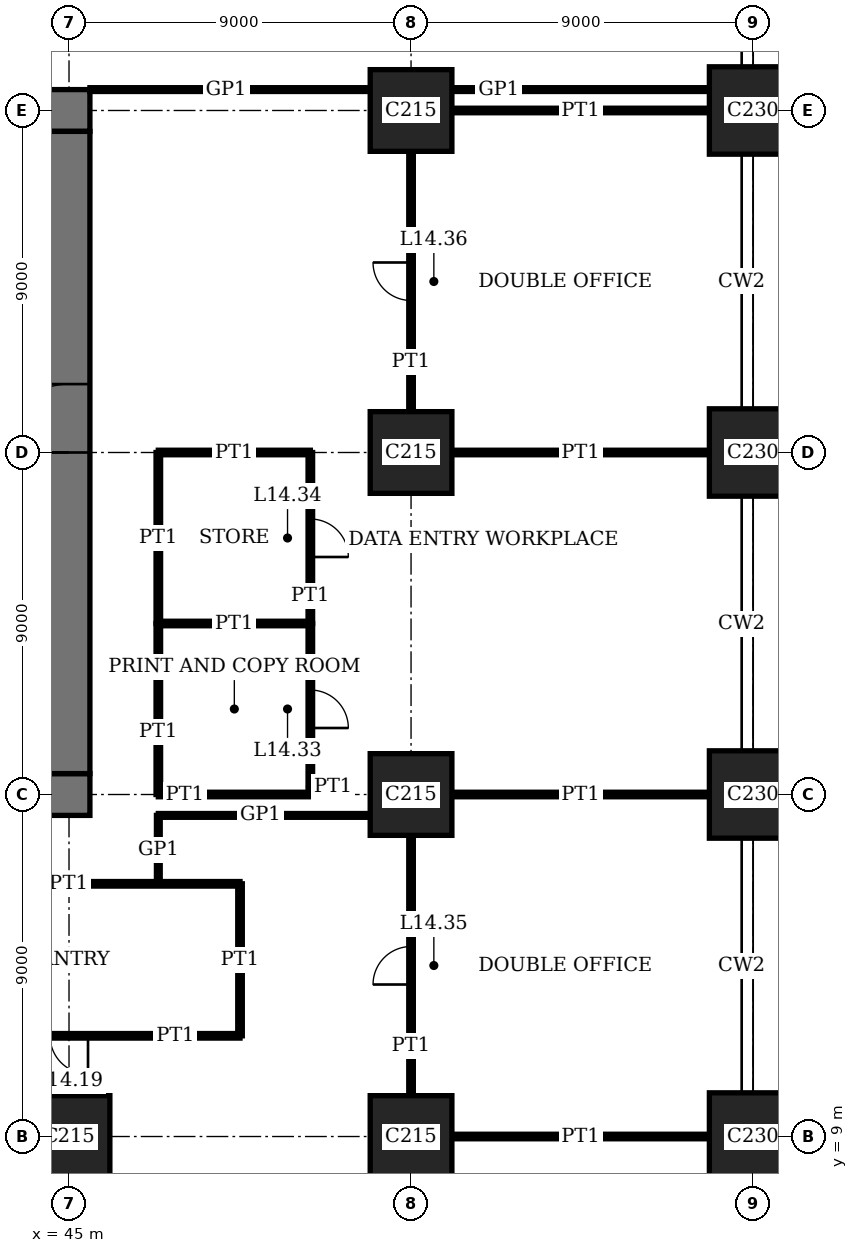
"""IFC4 building model, lengths in metres.
Left out: names, types, materials, properties, quantities, classifications, styles, units other than length and angle.
Written with IfcOpenShell. Run it as: python <this file> out.ifc"""

import sys

from ifc_helpers import new_model, si_unit, direction, frame, frame_2d, origin, origin_2d, place, context, subcontext, project, spatial, rectangle, extrude, element, fill, save


model = new_model("IFC4")
c1 = context("Model", 3, precision=1e-05, world=origin(), true_north=direction((0.0, 1.0)))
c2 = subcontext(c1, "Body", "Model", "MODEL_VIEW")
j1 = project(units=[si_unit("LENGTHUNIT", "METRE"), si_unit("PLANEANGLEUNIT", "RADIAN")], contexts=[c1])
p1 = place(None, origin())
s1 = spatial("IfcSite", under=j1, at=p1, CompositionType="ELEMENT")
p2 = place(p1, origin())
s2 = spatial("IfcBuilding", under=s1, at=p2, CompositionType="ELEMENT")
p3 = place(p2, frame((0.0, 0.0, 59.8)))
s3 = spatial("IfcBuildingStorey", under=s2, at=p3, CompositionType="ELEMENT", Elevation=59.8)
for number, where, z_axis, x_axis in (
    (1, (45.0, 9.0, 0.0), (0.0, 0.0, 1.0), (1.0, 0.0, 0.0)),
    (2, (54.0, 9.0, 0.0), (0.0, 0.0, 1.0), (1.0, 0.0, 0.0)),
    (3, (54.0, 18.0, 0.0), (0.0, 0.0, 1.0), (1.0, 0.0, 0.0)),
    (4, (54.0, 27.0, 0.0), (0.0, 0.0, 1.0), (1.0, 0.0, 0.0)),
    (5, (54.0, 36.0, 0.0), (0.0, 0.0, 1.0), (1.0, 0.0, 0.0)),
):
    element("IfcColumn", number, at=place(p3, frame(where, z_axis=z_axis, x_axis=x_axis)), inside=s3, PredefinedType="COLUMN", context=c2, shape_type="SweptSolid", body=[
        extrude(rectangle(XDim=2.15, YDim=2.15, at=origin_2d()), origin(), (0.0, 0.0, 1.0), 4.0),
    ])
for number, where, z_axis, x_axis in (
    (6, (63.0, 9.0, 0.0), (0.0, 0.0, 1.0), (1.0, 0.0, 0.0)),
    (7, (63.0, 18.0, 0.0), (0.0, 0.0, 1.0), (1.0, 0.0, 0.0)),
    (8, (63.0, 27.0, 0.0), (0.0, 0.0, 1.0), (1.0, 0.0, 0.0)),
    (9, (63.0, 36.0, 0.0), (0.0, 0.0, 1.0), (1.0, 0.0, 0.0)),
):
    element("IfcColumn", number, at=place(p3, frame(where, z_axis=z_axis, x_axis=x_axis)), inside=s3, PredefinedType="COLUMN", context=c2, shape_type="SweptSolid", body=[
        extrude(rectangle(XDim=2.3, YDim=2.3, at=origin_2d()), origin(), (0.0, 0.0, 1.0), 4.0),
    ])
p4 = place(p3, frame((17.45, 18.0, 0.0), z_axis=(0.0, 0.0, 1.0), x_axis=(1.0, 0.0, 0.0)))
e10 = element("IfcWall", 10, at=p4, inside=s3, PredefinedType="SHEAR", context=c2, shape_type="SweptSolid", body=[
    extrude(rectangle(XDim=28.1, YDim=1.1, at=frame_2d((14.05, 0.0))), origin(), (0.0, 0.0, 1.0), 4.0),
])
p5 = place(p4, frame((11.55, 0.0, 0.0)))
e11 = element("IfcOpeningElement", 11, at=p5, cuts=e10, PredefinedType="OPENING", context=c2, shape_type="SweptSolid", body=[
    extrude(rectangle(XDim=1.0, YDim=2.4, at=frame_2d((0.5, 1.2))), frame((0.0, 0.56, 0.0), z_axis=(0.0, -1.0, 0.0), x_axis=(1.0, 0.0, 0.0)), (0.0, 0.0, 1.0), 1.12),
])
p6 = place(p4, frame((16.55, 0.0, 0.0)))
e12 = element("IfcOpeningElement", 12, at=p6, cuts=e10, PredefinedType="OPENING", context=c2, shape_type="SweptSolid", body=[
    extrude(rectangle(XDim=1.0, YDim=2.4, at=frame_2d((0.5, 1.2))), frame((0.0, 0.56, 0.0), z_axis=(0.0, -1.0, 0.0), x_axis=(1.0, 0.0, 0.0)), (0.0, 0.0, 1.0), 1.12),
])
p7 = place(p4, frame((20.0, 0.0, 0.0)))
e13 = element("IfcOpeningElement", 13, at=p7, cuts=e10, PredefinedType="OPENING", context=c2, shape_type="SweptSolid", body=[
    extrude(rectangle(XDim=1.1, YDim=2.4, at=frame_2d((0.55, 1.2))), frame((0.0, 0.56, 0.0), z_axis=(0.0, -1.0, 0.0), x_axis=(1.0, 0.0, 0.0)), (0.0, 0.0, 1.0), 1.12),
])
p8 = place(p4, frame((24.05, 0.0, 0.0)))
e14 = element("IfcOpeningElement", 14, at=p8, cuts=e10, PredefinedType="OPENING", context=c2, shape_type="SweptSolid", body=[
    extrude(rectangle(XDim=1.0, YDim=2.4, at=frame_2d((0.5, 1.2))), frame((0.0, 0.56, 0.0), z_axis=(0.0, -1.0, 0.0), x_axis=(1.0, 0.0, 0.0)), (0.0, 0.0, 1.0), 1.12),
])
p9 = place(p3, frame((45.55, 36.0, 0.0), z_axis=(0.0, 0.0, 1.0), x_axis=(-1.0, 0.0, 0.0)))
e15 = element("IfcWall", 15, at=p9, inside=s3, PredefinedType="SHEAR", context=c2, shape_type="SweptSolid", body=[
    extrude(rectangle(XDim=28.1, YDim=1.1, at=frame_2d((14.05, 0.0))), origin(), (0.0, 0.0, 1.0), 4.0),
])
p10 = place(p9, frame((11.55, 0.0, 0.0)))
e16 = element("IfcOpeningElement", 16, at=p10, cuts=e15, PredefinedType="OPENING", context=c2, shape_type="SweptSolid", body=[
    extrude(rectangle(XDim=1.0, YDim=2.4, at=frame_2d((0.5, 1.2))), frame((0.0, 0.56, 0.0), z_axis=(0.0, -1.0, 0.0), x_axis=(1.0, 0.0, 0.0)), (0.0, 0.0, 1.0), 1.12),
])
p11 = place(p9, frame((16.55, 0.0, 0.0)))
e17 = element("IfcOpeningElement", 17, at=p11, cuts=e15, PredefinedType="OPENING", context=c2, shape_type="SweptSolid", body=[
    extrude(rectangle(XDim=1.0, YDim=2.4, at=frame_2d((0.5, 1.2))), frame((0.0, 0.56, 0.0), z_axis=(0.0, -1.0, 0.0), x_axis=(1.0, 0.0, 0.0)), (0.0, 0.0, 1.0), 1.12),
])
p12 = place(p9, frame((20.0, 0.0, 0.0)))
e18 = element("IfcOpeningElement", 18, at=p12, cuts=e15, PredefinedType="OPENING", context=c2, shape_type="SweptSolid", body=[
    extrude(rectangle(XDim=1.1, YDim=2.4, at=frame_2d((0.55, 1.2))), frame((0.0, 0.56, 0.0), z_axis=(0.0, -1.0, 0.0), x_axis=(1.0, 0.0, 0.0)), (0.0, 0.0, 1.0), 1.12),
])
p13 = place(p9, frame((24.05, 0.0, 0.0)))
e19 = element("IfcOpeningElement", 19, at=p13, cuts=e15, PredefinedType="OPENING", context=c2, shape_type="SweptSolid", body=[
    extrude(rectangle(XDim=1.0, YDim=2.4, at=frame_2d((0.5, 1.2))), frame((0.0, 0.56, 0.0), z_axis=(0.0, -1.0, 0.0), x_axis=(1.0, 0.0, 0.0)), (0.0, 0.0, 1.0), 1.12),
])
p14 = place(p3, frame((45.0, 18.55, 0.0), z_axis=(0.0, 0.0, 1.0), x_axis=(0.0, 1.0, 0.0)))
e20 = element("IfcWall", 20, at=p14, inside=s3, PredefinedType="SHEAR", context=c2, shape_type="SweptSolid", body=[
    extrude(rectangle(XDim=16.9, YDim=1.1, at=frame_2d((8.45, 0.0))), origin(), (0.0, 0.0, 1.0), 4.0),
])
p15 = place(p14, frame((8.45, 0.0, 0.0)))
e21 = element("IfcOpeningElement", 21, at=p15, cuts=e20, PredefinedType="OPENING", context=c2, shape_type="SweptSolid", body=[
    extrude(rectangle(XDim=1.8, YDim=2.4, at=frame_2d((0.9, 1.2))), frame((0.0, 0.56, 0.0), z_axis=(0.0, -1.0, 0.0), x_axis=(1.0, 0.0, 0.0)), (0.0, 0.0, 1.0), 1.12),
])
p16 = place(p3, frame((55.075, 9.0, 0.0), z_axis=(0.0, 0.0, 1.0), x_axis=(1.0, 0.0, 0.0)))
e22 = element("IfcWall", 22, at=p16, inside=s3, PredefinedType="PARTITIONING", context=c2, shape_type="SweptSolid", body=[
    extrude(rectangle(XDim=6.775, YDim=0.12, at=frame_2d((3.388, 0.0))), origin(), (0.0, 0.0, 1.0), 3.05),
])
p17 = place(p3, frame((40.5, 11.65, 0.0), z_axis=(0.0, 0.0, 1.0), x_axis=(1.0, 0.0, 0.0)))
e23 = element("IfcWall", 23, at=p17, inside=s3, PredefinedType="PARTITIONING", context=c2, shape_type="SweptSolid", body=[
    extrude(rectangle(XDim=9.0, YDim=0.12, at=frame_2d((4.5, 0.0))), origin(), (0.0, 0.0, 1.0), 3.75),
])
p18 = place(p17, frame((4.0, 0.0, 0.0)))
e24 = element("IfcOpeningElement", 24, at=p18, cuts=e23, PredefinedType="OPENING", context=c2, shape_type="SweptSolid", body=[
    extrude(rectangle(XDim=1.0, YDim=2.4, at=frame_2d((0.5, 1.2))), frame((0.0, 0.07, 0.0), z_axis=(0.0, -1.0, 0.0), x_axis=(1.0, 0.0, 0.0)), (0.0, 0.0, 1.0), 0.14),
])
p19 = place(p3, frame((40.5, 15.65, 0.0), z_axis=(0.0, 0.0, 1.0), x_axis=(1.0, 0.0, 0.0)))
e25 = element("IfcWall", 25, at=p19, inside=s3, PredefinedType="PARTITIONING", context=c2, shape_type="SweptSolid", body=[
    extrude(rectangle(XDim=9.0, YDim=0.12, at=frame_2d((4.5, 0.0))), origin(), (0.0, 0.0, 1.0), 3.75),
])
p20 = place(p3, frame((47.35, 17.45, 0.0), z_axis=(0.0, 0.0, 1.0), x_axis=(1.0, 0.0, 0.0)))
e26 = element("IfcWall", 26, at=p20, inside=s3, PredefinedType="PARTITIONING", context=c2, shape_type="SweptSolid", body=[
    extrude(rectangle(XDim=5.575, YDim=0.1, at=frame_2d((2.788, 0.0))), origin(), (0.0, 0.0, 1.0), 3.75),
])
p21 = place(p3, frame((47.35, 18.0, 0.0), z_axis=(0.0, 0.0, 1.0), x_axis=(1.0, 0.0, 0.0)))
e27 = element("IfcWall", 27, at=p21, inside=s3, PredefinedType="PARTITIONING", context=c2, shape_type="SweptSolid", body=[
    extrude(rectangle(XDim=4.0, YDim=0.12, at=frame_2d((2.0, 0.0))), origin(), (0.0, 0.0, 1.0), 3.05),
])
p22 = place(p3, frame((55.075, 18.0, 0.0), z_axis=(0.0, 0.0, 1.0), x_axis=(1.0, 0.0, 0.0)))
e28 = element("IfcWall", 28, at=p22, inside=s3, PredefinedType="PARTITIONING", context=c2, shape_type="SweptSolid", body=[
    extrude(rectangle(XDim=6.775, YDim=0.12, at=frame_2d((3.388, 0.0))), origin(), (0.0, 0.0, 1.0), 3.05),
])
p23 = place(p3, frame((47.35, 22.5, 0.0), z_axis=(0.0, 0.0, 1.0), x_axis=(1.0, 0.0, 0.0)))
e29 = element("IfcWall", 29, at=p23, inside=s3, PredefinedType="PARTITIONING", context=c2, shape_type="SweptSolid", body=[
    extrude(rectangle(XDim=4.0, YDim=0.12, at=frame_2d((2.0, 0.0))), origin(), (0.0, 0.0, 1.0), 3.1),
])
p24 = place(p3, frame((47.35, 27.0, 0.0), z_axis=(0.0, 0.0, 1.0), x_axis=(1.0, 0.0, 0.0)))
e30 = element("IfcWall", 30, at=p24, inside=s3, PredefinedType="PARTITIONING", context=c2, shape_type="SweptSolid", body=[
    extrude(rectangle(XDim=4.0, YDim=0.12, at=frame_2d((2.0, 0.0))), origin(), (0.0, 0.0, 1.0), 3.05),
])
for number, where, z_axis, x_axis in (
    (31, (55.075, 27.0, 0.0), (0.0, 0.0, 1.0), (1.0, 0.0, 0.0)),
    (32, (55.075, 36.0, 0.0), (0.0, 0.0, 1.0), (1.0, 0.0, 0.0)),
):
    element("IfcWall", number, at=place(p3, frame(where, z_axis=z_axis, x_axis=x_axis)), inside=s3, PredefinedType="PARTITIONING", context=c2, shape_type="SweptSolid", body=[
        extrude(rectangle(XDim=6.775, YDim=0.12, at=frame_2d((3.388, 0.0))), origin(), (0.0, 0.0, 1.0), 3.05),
    ])
p25 = place(p3, frame((45.55, 36.55, 0.0), z_axis=(0.0, 0.0, 1.0), x_axis=(1.0, 0.0, 0.0)))
e33 = element("IfcWall", 33, at=p25, inside=s3, PredefinedType="PARTITIONING", context=c2, shape_type="SweptSolid", body=[
    extrude(rectangle(XDim=7.375, YDim=0.1, at=frame_2d((3.688, 0.0))), origin(), (0.0, 0.0, 1.0), 3.75),
])
p26 = place(p3, frame((55.075, 36.55, 0.0), z_axis=(0.0, 0.0, 1.0), x_axis=(1.0, 0.0, 0.0)))
e34 = element("IfcWall", 34, at=p26, inside=s3, PredefinedType="PARTITIONING", context=c2, shape_type="SweptSolid", body=[
    extrude(rectangle(XDim=6.775, YDim=0.1, at=frame_2d((3.388, 0.0))), origin(), (0.0, 0.0, 1.0), 3.75),
])
for number, where, z_axis, x_axis in (
    (35, (47.35, 18.0, 0.0), (0.0, 0.0, 1.0), (0.0, 1.0, 0.0)),
    (36, (47.35, 22.5, 0.0), (0.0, 0.0, 1.0), (0.0, 1.0, 0.0)),
):
    element("IfcWall", number, at=place(p3, frame(where, z_axis=z_axis, x_axis=x_axis)), inside=s3, PredefinedType="PARTITIONING", context=c2, shape_type="SweptSolid", body=[
        extrude(rectangle(XDim=4.5, YDim=0.12, at=frame_2d((2.25, 0.0))), origin(), (0.0, 0.0, 1.0), 3.75),
    ])
p27 = place(p3, frame((47.35, 15.65, 0.0), z_axis=(0.0, 0.0, 1.0), x_axis=(0.0, 1.0, 0.0)))
e37 = element("IfcWall", 37, at=p27, inside=s3, PredefinedType="PARTITIONING", context=c2, shape_type="SweptSolid", body=[
    extrude(rectangle(XDim=1.8, YDim=0.1, at=frame_2d((0.9, 0.0))), origin(), (0.0, 0.0, 1.0), 3.75),
])
p28 = place(p3, frame((49.5, 11.65, 0.0), z_axis=(0.0, 0.0, 1.0), x_axis=(0.0, 1.0, 0.0)))
e38 = element("IfcWall", 38, at=p28, inside=s3, PredefinedType="PARTITIONING", context=c2, shape_type="SweptSolid", body=[
    extrude(rectangle(XDim=4.0, YDim=0.12, at=frame_2d((2.0, 0.0))), origin(), (0.0, 0.0, 1.0), 3.75),
])
p29 = place(p3, frame((51.35, 18.0, 0.0), z_axis=(0.0, 0.0, 1.0), x_axis=(0.0, 1.0, 0.0)))
e39 = element("IfcWall", 39, at=p29, inside=s3, PredefinedType="PARTITIONING", context=c2, shape_type="SweptSolid", body=[
    extrude(rectangle(XDim=4.5, YDim=0.12, at=frame_2d((2.25, 0.0))), origin(), (0.0, 0.0, 1.0), 3.75),
])
p30 = place(p29, frame((1.75, 0.0, 0.0)))
e40 = element("IfcOpeningElement", 40, at=p30, cuts=e39, PredefinedType="OPENING", context=c2, shape_type="SweptSolid", body=[
    extrude(rectangle(XDim=1.0, YDim=2.4, at=frame_2d((0.5, 1.2))), frame((0.0, 0.07, 0.0), z_axis=(0.0, -1.0, 0.0), x_axis=(1.0, 0.0, 0.0)), (0.0, 0.0, 1.0), 0.14),
])
p31 = place(p3, frame((51.35, 22.5, 0.0), z_axis=(0.0, 0.0, 1.0), x_axis=(0.0, 1.0, 0.0)))
e41 = element("IfcWall", 41, at=p31, inside=s3, PredefinedType="PARTITIONING", context=c2, shape_type="SweptSolid", body=[
    extrude(rectangle(XDim=4.5, YDim=0.12, at=frame_2d((2.25, 0.0))), origin(), (0.0, 0.0, 1.0), 3.75),
])
p32 = place(p31, frame((1.75, 0.0, 0.0)))
e42 = element("IfcOpeningElement", 42, at=p32, cuts=e41, PredefinedType="OPENING", context=c2, shape_type="SweptSolid", body=[
    extrude(rectangle(XDim=1.0, YDim=2.4, at=frame_2d((0.5, 1.2))), frame((0.0, 0.07, 0.0), z_axis=(0.0, -1.0, 0.0), x_axis=(1.0, 0.0, 0.0)), (0.0, 0.0, 1.0), 0.14),
])
p33 = place(p3, frame((54.0, 10.075, 0.0), z_axis=(0.0, 0.0, 1.0), x_axis=(0.0, 1.0, 0.0)))
e43 = element("IfcWall", 43, at=p33, inside=s3, PredefinedType="PARTITIONING", context=c2, shape_type="SweptSolid", body=[
    extrude(rectangle(XDim=6.85, YDim=0.12, at=frame_2d((3.425, 0.0))), origin(), (0.0, 0.0, 1.0), 3.05),
])
p34 = place(p33, frame((2.925, 0.0, 0.0)))
e44 = element("IfcOpeningElement", 44, at=p34, cuts=e43, PredefinedType="OPENING", context=c2, shape_type="SweptSolid", body=[
    extrude(rectangle(XDim=1.0, YDim=2.4, at=frame_2d((0.5, 1.2))), frame((0.0, 0.07, 0.0), z_axis=(0.0, -1.0, 0.0), x_axis=(1.0, 0.0, 0.0)), (0.0, 0.0, 1.0), 0.14),
])
p35 = place(p3, frame((54.0, 28.075, 0.0), z_axis=(0.0, 0.0, 1.0), x_axis=(0.0, 1.0, 0.0)))
e45 = element("IfcWall", 45, at=p35, inside=s3, PredefinedType="PARTITIONING", context=c2, shape_type="SweptSolid", body=[
    extrude(rectangle(XDim=6.85, YDim=0.12, at=frame_2d((3.425, 0.0))), origin(), (0.0, 0.0, 1.0), 3.05),
])
p36 = place(p35, frame((2.925, 0.0, 0.0)))
e46 = element("IfcOpeningElement", 46, at=p36, cuts=e45, PredefinedType="OPENING", context=c2, shape_type="SweptSolid", body=[
    extrude(rectangle(XDim=1.0, YDim=2.4, at=frame_2d((0.5, 1.2))), frame((0.0, 0.07, 0.0), z_axis=(0.0, -1.0, 0.0), x_axis=(1.0, 0.0, 0.0)), (0.0, 0.0, 1.0), 0.14),
])
p37 = place(p15, origin())
e47 = element("IfcDoor", 47, at=p37, inside=s3, OperationType="DOUBLE_DOOR_DOUBLE_SWING", PredefinedType="DOOR", context=c2, shape_type="SweptSolid", body=[
    extrude(rectangle(XDim=1.8, YDim=2.4, at=frame_2d((0.9, 1.2))), frame((0.0, 0.03, 0.0), z_axis=(0.0, -1.0, 0.0), x_axis=(1.0, 0.0, 0.0)), (0.0, 0.0, 1.0), 0.06),
    extrude(rectangle(XDim=0.04, YDim=2.4, at=frame_2d((0.02, 1.2))), frame((0.0, 0.55, 0.0), z_axis=(0.0, -1.0, 0.0), x_axis=(1.0, 0.0, 0.0)), (0.0, 0.0, 1.0), 1.1),
    extrude(rectangle(XDim=0.04, YDim=2.4, at=frame_2d((1.78, 1.2))), frame((0.0, 0.55, 0.0), z_axis=(0.0, -1.0, 0.0), x_axis=(1.0, 0.0, 0.0)), (0.0, 0.0, 1.0), 1.1),
    extrude(rectangle(XDim=1.8, YDim=0.04, at=frame_2d((0.9, 2.38))), frame((0.0, 0.55, 0.0), z_axis=(0.0, -1.0, 0.0), x_axis=(1.0, 0.0, 0.0)), (0.0, 0.0, 1.0), 1.1),
])
fill(e21, e47)
p38 = place(p18, origin())
e48 = element("IfcDoor", 48, at=p38, inside=s3, OperationType="SINGLE_SWING_RIGHT", PredefinedType="DOOR", context=c2, shape_type="SweptSolid", body=[
    extrude(rectangle(XDim=1.0, YDim=2.4, at=frame_2d((0.5, 1.2))), frame((0.0, 0.025, 0.0), z_axis=(0.0, -1.0, 0.0), x_axis=(1.0, 0.0, 0.0)), (0.0, 0.0, 1.0), 0.05),
])
fill(e24, e48)
p39 = place(p30, origin())
e49 = element("IfcDoor", 49, at=p39, inside=s3, OperationType="SINGLE_SWING_LEFT", PredefinedType="DOOR", context=c2, shape_type="SweptSolid", body=[
    extrude(rectangle(XDim=1.0, YDim=2.4, at=frame_2d((0.5, 1.2))), frame((0.0, 0.025, 0.0), z_axis=(0.0, -1.0, 0.0), x_axis=(1.0, 0.0, 0.0)), (0.0, 0.0, 1.0), 0.05),
])
fill(e40, e49)
p40 = place(p32, origin())
e50 = element("IfcDoor", 50, at=p40, inside=s3, OperationType="SINGLE_SWING_LEFT", PredefinedType="DOOR", context=c2, shape_type="SweptSolid", body=[
    extrude(rectangle(XDim=1.0, YDim=2.4, at=frame_2d((0.5, 1.2))), frame((0.0, 0.025, 0.0), z_axis=(0.0, -1.0, 0.0), x_axis=(1.0, 0.0, 0.0)), (0.0, 0.0, 1.0), 0.05),
])
fill(e42, e50)
p41 = place(p34, origin())
e51 = element("IfcDoor", 51, at=p41, inside=s3, OperationType="SINGLE_SWING_RIGHT", PredefinedType="DOOR", context=c2, shape_type="SweptSolid", body=[
    extrude(rectangle(XDim=1.0, YDim=2.4, at=frame_2d((0.5, 1.2))), frame((0.0, 0.025, 0.0), z_axis=(0.0, -1.0, 0.0), x_axis=(1.0, 0.0, 0.0)), (0.0, 0.0, 1.0), 0.05),
])
fill(e44, e51)
p42 = place(p36, origin())
e52 = element("IfcDoor", 52, at=p42, inside=s3, OperationType="SINGLE_SWING_LEFT", PredefinedType="DOOR", context=c2, shape_type="SweptSolid", body=[
    extrude(rectangle(XDim=1.0, YDim=2.4, at=frame_2d((0.5, 1.2))), frame((0.0, 0.025, 0.0), z_axis=(0.0, -1.0, 0.0), x_axis=(1.0, 0.0, 0.0)), (0.0, 0.0, 1.0), 0.05),
])
fill(e46, e52)
save(model, sys.argv[1])
